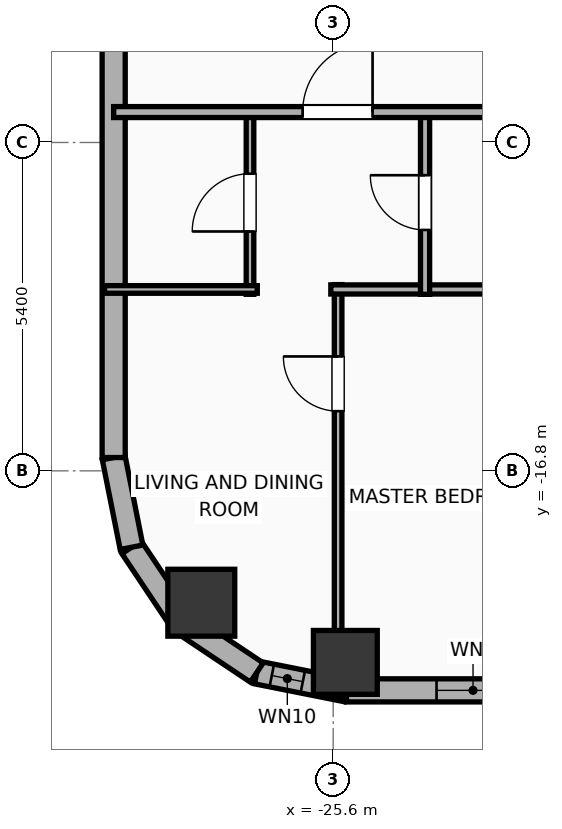
"""IFC4 building model, lengths in metres.
Left out: names, types, materials, properties, quantities, classifications, styles, units other than length and angle.
Written with IfcOpenShell. Run it as: python <this file> out.ifc"""

import sys

from ifc_helpers import new_model, si_unit, direction, frame, frame_2d, origin, origin_2d, place, context, subcontext, project, spatial, rectangle, hollow_rectangle, hollow_circle, extrude, element, fill, save


model = new_model("IFC4")
c1 = context("Model", 3, precision=1e-05, world=origin(), true_north=direction((0.0, 1.0)))
c2 = subcontext(c1, "Body", "Model", "MODEL_VIEW")
j1 = project(units=[si_unit("LENGTHUNIT", "METRE"), si_unit("PLANEANGLEUNIT", "RADIAN")], contexts=[c1])
p1 = place(None, origin())
s1 = spatial("IfcSite", under=j1, at=p1, CompositionType="ELEMENT")
p2 = place(p1, origin())
s2 = spatial("IfcBuilding", under=s1, at=p2, CompositionType="ELEMENT")
p3 = place(p2, frame((0.0, 0.0, 89.7)))
s3 = spatial("IfcBuildingStorey", under=s2, at=p3, CompositionType="ELEMENT", Elevation=89.7)
p4 = place(p3, frame((-25.4, -19.95, 0.0), z_axis=(0.0, 0.0, 1.0), x_axis=(1.0, 0.0, 0.0)))
e1 = element("IfcColumn", 1, at=p4, inside=s3, PredefinedType="COLUMN", context=c2, shape_type="SweptSolid", body=[
    extrude(hollow_rectangle(XDim=1.05, YDim=1.05, WallThickness=0.036, at=origin_2d()), origin(), (0.0, 0.0, 1.0), 3.9),
])
p5 = place(p3, frame((-27.769, -18.969, 0.0), z_axis=(0.0, 0.0, 1.0), x_axis=(1.0, 0.0, 0.0)))
e2 = element("IfcColumn", 2, at=p5, inside=s3, PredefinedType="COLUMN", context=c2, shape_type="SweptSolid", body=[
    extrude(hollow_circle(Radius=0.55, WallThickness=0.036, at=origin_2d()), origin(), (0.0, 0.0, 1.0), 3.9),
])
p6 = place(p3, frame((29.381, -20.41, 0.0), z_axis=(0.0, 0.0, 1.0), x_axis=(-1.0, 0.0, 0.0)))
e3 = element("IfcWall", 3, at=p6, inside=s3, PredefinedType="ELEMENTEDWALL", context=c2, shape_type="SweptSolid", body=[
    extrude(rectangle(XDim=54.763, YDim=0.38, at=frame_2d((27.381, 0.0))), origin(), (0.0, 0.0, 1.0), 2.54),
])
p7 = place(p6, frame((48.367, 0.0, 0.75)))
e4 = element("IfcOpeningElement", 4, at=p7, cuts=e3, PredefinedType="OPENING", context=c2, shape_type="SweptSolid", body=[
    extrude(rectangle(XDim=2.4, YDim=1.63, at=frame_2d((1.2, 0.815))), frame((0.0, 0.2, 0.0), z_axis=(0.0, -1.0, 0.0), x_axis=(1.0, 0.0, 0.0)), (0.0, 0.0, 1.0), 0.4),
])
p8 = place(p6, frame((52.081, 0.0, 0.75)))
e5 = element("IfcOpeningElement", 5, at=p8, cuts=e3, PredefinedType="OPENING", context=c2, shape_type="SweptSolid", body=[
    extrude(rectangle(XDim=1.2, YDim=1.63, at=frame_2d((0.6, 0.815))), frame((0.0, 0.2, 0.0), z_axis=(0.0, -1.0, 0.0), x_axis=(1.0, 0.0, 0.0)), (0.0, 0.0, 1.0), 0.4),
])
p9 = place(p6, frame((45.486, 0.0, 0.75)))
e6 = element("IfcOpeningElement", 6, at=p9, cuts=e3, PredefinedType="OPENING", context=c2, shape_type="SweptSolid", body=[
    extrude(rectangle(XDim=1.2, YDim=1.63, at=frame_2d((0.6, 0.815))), frame((0.0, 0.2, 0.0), z_axis=(0.0, -1.0, 0.0), x_axis=(1.0, 0.0, 0.0)), (0.0, 0.0, 1.0), 0.4),
])
p10 = place(p6, frame((40.531, 0.0, 0.75)))
e7 = element("IfcOpeningElement", 7, at=p10, cuts=e3, PredefinedType="OPENING", context=c2, shape_type="SweptSolid", body=[
    extrude(rectangle(XDim=1.2, YDim=1.63, at=frame_2d((0.6, 0.815))), frame((0.0, 0.2, 0.0), z_axis=(0.0, -1.0, 0.0), x_axis=(1.0, 0.0, 0.0)), (0.0, 0.0, 1.0), 0.4),
])
p11 = place(p6, frame((33.686, 0.0, 0.75)))
e8 = element("IfcOpeningElement", 8, at=p11, cuts=e3, PredefinedType="OPENING", context=c2, shape_type="SweptSolid", body=[
    extrude(rectangle(XDim=1.2, YDim=1.63, at=frame_2d((0.6, 0.815))), frame((0.0, 0.2, 0.0), z_axis=(0.0, -1.0, 0.0), x_axis=(1.0, 0.0, 0.0)), (0.0, 0.0, 1.0), 0.4),
])
p12 = place(p6, frame((35.976, 0.0, 0.75)))
e9 = element("IfcOpeningElement", 9, at=p12, cuts=e3, PredefinedType="OPENING", context=c2, shape_type="SweptSolid", body=[
    extrude(rectangle(XDim=1.2, YDim=1.63, at=frame_2d((0.6, 0.815))), frame((0.0, 0.2, 0.0), z_axis=(0.0, -1.0, 0.0), x_axis=(1.0, 0.0, 0.0)), (0.0, 0.0, 1.0), 0.4),
])
p13 = place(p6, frame((28.805, 0.0, 0.75)))
e10 = element("IfcOpeningElement", 10, at=p13, cuts=e3, PredefinedType="OPENING", context=c2, shape_type="SweptSolid", body=[
    extrude(rectangle(XDim=1.2, YDim=1.63, at=frame_2d((0.6, 0.815))), frame((0.0, 0.2, 0.0), z_axis=(0.0, -1.0, 0.0), x_axis=(1.0, 0.0, 0.0)), (0.0, 0.0, 1.0), 0.4),
])
p14 = place(p6, frame((25.555, 0.0, 0.75)))
e11 = element("IfcOpeningElement", 11, at=p14, cuts=e3, PredefinedType="OPENING", context=c2, shape_type="SweptSolid", body=[
    extrude(rectangle(XDim=1.2, YDim=1.63, at=frame_2d((0.6, 0.815))), frame((0.0, 0.2, 0.0), z_axis=(0.0, -1.0, 0.0), x_axis=(1.0, 0.0, 0.0)), (0.0, 0.0, 1.0), 0.4),
])
p15 = place(p6, frame((19.951, 0.0, 0.75)))
e12 = element("IfcOpeningElement", 12, at=p15, cuts=e3, PredefinedType="OPENING", context=c2, shape_type="SweptSolid", body=[
    extrude(rectangle(XDim=1.2, YDim=1.63, at=frame_2d((0.6, 0.815))), frame((0.0, 0.2, 0.0), z_axis=(0.0, -1.0, 0.0), x_axis=(1.0, 0.0, 0.0)), (0.0, 0.0, 1.0), 0.4),
])
p16 = place(p6, frame((16.008, 0.0, 0.75)))
e13 = element("IfcOpeningElement", 13, at=p16, cuts=e3, PredefinedType="OPENING", context=c2, shape_type="SweptSolid", body=[
    extrude(rectangle(XDim=1.2, YDim=1.63, at=frame_2d((0.6, 0.815))), frame((0.0, 0.2, 0.0), z_axis=(0.0, -1.0, 0.0), x_axis=(1.0, 0.0, 0.0)), (0.0, 0.0, 1.0), 0.4),
])
p17 = place(p6, frame((13.008, 0.0, 0.75)))
e14 = element("IfcOpeningElement", 14, at=p17, cuts=e3, PredefinedType="OPENING", context=c2, shape_type="SweptSolid", body=[
    extrude(rectangle(XDim=1.2, YDim=1.63, at=frame_2d((0.6, 0.815))), frame((0.0, 0.2, 0.0), z_axis=(0.0, -1.0, 0.0), x_axis=(1.0, 0.0, 0.0)), (0.0, 0.0, 1.0), 0.4),
])
p18 = place(p6, frame((8.948, 0.0, 0.75)))
e15 = element("IfcOpeningElement", 15, at=p18, cuts=e3, PredefinedType="OPENING", context=c2, shape_type="SweptSolid", body=[
    extrude(rectangle(XDim=1.2, YDim=1.63, at=frame_2d((0.6, 0.815))), frame((0.0, 0.2, 0.0), z_axis=(0.0, -1.0, 0.0), x_axis=(1.0, 0.0, 0.0)), (0.0, 0.0, 1.0), 0.4),
])
p19 = place(p6, frame((6.908, 0.0, 0.75)))
e16 = element("IfcOpeningElement", 16, at=p19, cuts=e3, PredefinedType="OPENING", context=c2, shape_type="SweptSolid", body=[
    extrude(rectangle(XDim=1.2, YDim=1.63, at=frame_2d((0.6, 0.815))), frame((0.0, 0.2, 0.0), z_axis=(0.0, -1.0, 0.0), x_axis=(1.0, 0.0, 0.0)), (0.0, 0.0, 1.0), 0.4),
])
p20 = place(p6, frame((1.695, 0.0, 0.75)))
e17 = element("IfcOpeningElement", 17, at=p20, cuts=e3, PredefinedType="OPENING", context=c2, shape_type="SweptSolid", body=[
    extrude(rectangle(XDim=1.2, YDim=1.63, at=frame_2d((0.6, 0.815))), frame((0.0, 0.2, 0.0), z_axis=(0.0, -1.0, 0.0), x_axis=(1.0, 0.0, 0.0)), (0.0, 0.0, 1.0), 0.4),
])
p21 = place(p6, frame((4.441, 0.0, 0.75)))
e18 = element("IfcOpeningElement", 18, at=p21, cuts=e3, PredefinedType="OPENING", context=c2, shape_type="SweptSolid", body=[
    extrude(rectangle(XDim=1.2, YDim=1.63, at=frame_2d((0.6, 0.815))), frame((0.0, 0.2, 0.0), z_axis=(0.0, -1.0, 0.0), x_axis=(1.0, 0.0, 0.0)), (0.0, 0.0, 1.0), 0.4),
])
p22 = place(p3, frame((-25.381, -20.41, 0.0), z_axis=(0.0, 0.0, 1.0), x_axis=(-0.980786132421, 0.195086038585, 0.0)))
e19 = element("IfcWall", 19, at=p22, inside=s3, PredefinedType="ELEMENTEDWALL", context=c2, shape_type="SweptSolid", body=[
    extrude(rectangle(XDim=1.504, YDim=0.38, at=frame_2d((0.752, 0.0))), origin(), (0.0, 0.0, 1.0), 2.54),
])
p23 = place(p22, frame((0.732, 0.0, 0.75)))
e20 = element("IfcOpeningElement", 20, at=p23, cuts=e19, PredefinedType="OPENING", context=c2, shape_type="SweptSolid", body=[
    extrude(rectangle(XDim=0.52, YDim=1.63, at=frame_2d((0.26, 0.815))), frame((0.0, 0.2, 0.0), z_axis=(0.0, -1.0, 0.0), x_axis=(1.0, 0.0, 0.0)), (0.0, 0.0, 1.0), 0.4),
])
p24 = place(p3, frame((-26.857, -20.116, 0.0), z_axis=(0.0, 0.0, 1.0), x_axis=(-0.831468045563, 0.555572577804, 0.0)))
e21 = element("IfcWall", 21, at=p24, inside=s3, PredefinedType="ELEMENTEDWALL", context=c2, shape_type="SweptSolid", body=[
    extrude(rectangle(XDim=1.485, YDim=0.38, at=frame_2d((0.742, 0.0))), origin(), (0.0, 0.0, 1.0), 2.54),
])
p25 = place(p3, frame((-28.091, -19.292, 0.0), z_axis=(0.0, 0.0, 1.0), x_axis=(-0.555610286119, 0.831442848281, 0.0)))
e22 = element("IfcWall", 22, at=p25, inside=s3, PredefinedType="ELEMENTEDWALL", context=c2, shape_type="SweptSolid", body=[
    extrude(rectangle(XDim=1.485, YDim=0.38, at=frame_2d((0.743, 0.0))), origin(), (0.0, 0.0, 1.0), 3.65),
])
p26 = place(p3, frame((-28.917, -18.057, 0.0), z_axis=(0.0, 0.0, 1.0), x_axis=(-0.195086038585, 0.980786132421, 0.0)))
e23 = element("IfcWall", 23, at=p26, inside=s3, PredefinedType="ELEMENTEDWALL", context=c2, shape_type="SweptSolid", body=[
    extrude(rectangle(XDim=1.504, YDim=0.38, at=frame_2d((0.752, 0.0))), origin(), (0.0, 0.0, 1.0), 3.65),
])
p27 = place(p3, frame((-29.21, -16.581, 0.0), z_axis=(0.0, 0.0, 1.0), x_axis=(0.0, 1.0, 0.0)))
e24 = element("IfcWall", 24, at=p27, inside=s3, PredefinedType="ELEMENTEDWALL", context=c2, shape_type="SweptSolid", body=[
    extrude(rectangle(XDim=34.363, YDim=0.38, at=frame_2d((17.181, 0.0))), origin(), (0.0, 0.0, 1.0), 2.54),
])
p28 = place(p27, frame((31.487, 0.0, 0.75)))
e25 = element("IfcOpeningElement", 25, at=p28, cuts=e24, PredefinedType="OPENING", context=c2, shape_type="SweptSolid", body=[
    extrude(rectangle(XDim=1.2, YDim=1.63, at=frame_2d((0.6, 0.815))), frame((0.0, 0.2, 0.0), z_axis=(0.0, -1.0, 0.0), x_axis=(1.0, 0.0, 0.0)), (0.0, 0.0, 1.0), 0.4),
])
p29 = place(p27, frame((20.726, 0.0, 0.75)))
e26 = element("IfcOpeningElement", 26, at=p29, cuts=e24, PredefinedType="OPENING", context=c2, shape_type="SweptSolid", body=[
    extrude(rectangle(XDim=1.2, YDim=1.63, at=frame_2d((0.6, 0.815))), frame((0.0, 0.2, 0.0), z_axis=(0.0, -1.0, 0.0), x_axis=(1.0, 0.0, 0.0)), (0.0, 0.0, 1.0), 0.4),
])
p30 = place(p27, frame((11.376, 0.0, 0.75)))
e27 = element("IfcOpeningElement", 27, at=p30, cuts=e24, PredefinedType="OPENING", context=c2, shape_type="SweptSolid", body=[
    extrude(rectangle(XDim=1.2, YDim=1.63, at=frame_2d((0.6, 0.815))), frame((0.0, 0.2, 0.0), z_axis=(0.0, -1.0, 0.0), x_axis=(1.0, 0.0, 0.0)), (0.0, 0.0, 1.0), 0.4),
])
p31 = place(p3, frame((-25.519, -20.535, 0.0), z_axis=(0.0, 0.0, 1.0), x_axis=(0.0, 1.0, 0.0)))
e28 = element("IfcWall", 28, at=p31, inside=s3, PredefinedType="PARTITIONING", context=c2, shape_type="SweptSolid", body=[
    extrude(rectangle(XDim=6.798, YDim=0.125, at=frame_2d((3.399, 0.0))), origin(), (0.0, 0.0, 1.0), 3.65),
])
p32 = place(p31, frame((4.717, 0.0, 0.0)))
e29 = element("IfcOpeningElement", 29, at=p32, cuts=e28, PredefinedType="OPENING", context=c2, shape_type="SweptSolid", body=[
    extrude(rectangle(XDim=0.9, YDim=2.05, at=frame_2d((0.45, 1.025))), frame((0.0, 0.073, 0.0), z_axis=(0.0, -1.0, 0.0), x_axis=(1.0, 0.0, 0.0)), (0.0, 0.0, 1.0), 0.145),
])
p33 = place(p3, frame((-25.639, -13.817, 0.0), z_axis=(0.0, 0.0, 1.0), x_axis=(1.0, 0.0, 0.0)))
e30 = element("IfcWall", 30, at=p33, inside=s3, PredefinedType="PLUMBINGWALL", context=c2, shape_type="SweptSolid", body=[
    extrude(rectangle(XDim=3.79, YDim=0.15, at=frame_2d((1.895, 0.0))), origin(), (0.0, 0.0, 1.0), 3.65),
])
p34 = place(p3, frame((-26.968, -13.897, 0.0), z_axis=(0.0, 0.0, 1.0), x_axis=(0.0, 1.0, 0.0)))
e31 = element("IfcWall", 31, at=p34, inside=s3, PredefinedType="PARTITIONING", context=c2, shape_type="SweptSolid", body=[
    extrude(rectangle(XDim=3.017, YDim=0.125, at=frame_2d((1.509, 0.0))), origin(), (0.0, 0.0, 1.0), 3.65),
])
p35 = place(p34, frame((1.033, 0.0, 0.0)))
e32 = element("IfcOpeningElement", 32, at=p35, cuts=e31, PredefinedType="OPENING", context=c2, shape_type="SweptSolid", body=[
    extrude(rectangle(XDim=0.95, YDim=2.05, at=frame_2d((0.475, 1.025))), frame((0.0, 0.073, 0.0), z_axis=(0.0, -1.0, 0.0), x_axis=(1.0, 0.0, 0.0)), (0.0, 0.0, 1.0), 0.145),
])
p36 = place(p3, frame((-29.36, -13.817, 0.0), z_axis=(0.0, 0.0, 1.0), x_axis=(1.0, 0.0, 0.0)))
e33 = element("IfcWall", 33, at=p36, inside=s3, PredefinedType="PARTITIONING", context=c2, shape_type="SweptSolid", body=[
    extrude(rectangle(XDim=2.512, YDim=0.125, at=frame_2d((1.256, 0.0))), origin(), (0.0, 0.0, 1.0), 3.65),
])
p37 = place(p3, frame((-24.089, -13.897, 0.0), z_axis=(0.0, 0.0, 1.0), x_axis=(0.0, 1.0, 0.0)))
e34 = element("IfcWall", 34, at=p37, inside=s3, PredefinedType="PLUMBINGWALL", context=c2, shape_type="SweptSolid", body=[
    extrude(rectangle(XDim=3.017, YDim=0.15, at=frame_2d((1.509, 0.0))), origin(), (0.0, 0.0, 1.0), 3.65),
])
p38 = place(p37, frame((1.059, 0.0, 0.0)))
e35 = element("IfcOpeningElement", 35, at=p38, cuts=e34, PredefinedType="OPENING", context=c2, shape_type="SweptSolid", body=[
    extrude(rectangle(XDim=0.9, YDim=2.05, at=frame_2d((0.45, 1.025))), frame((0.0, 0.085, 0.0), z_axis=(0.0, -1.0, 0.0), x_axis=(1.0, 0.0, 0.0)), (0.0, 0.0, 1.0), 0.17),
])
p39 = place(p3, frame((-29.21, -10.9, 0.0), z_axis=(0.0, 0.0, 1.0), x_axis=(1.0, 0.0, 0.0)))
e36 = element("IfcWall", 36, at=p39, inside=s3, PredefinedType="PARTITIONING", context=c2, shape_type="SweptSolid", body=[
    extrude(rectangle(XDim=62.42, YDim=0.18, at=frame_2d((31.21, 0.0))), origin(), (0.0, 0.0, 1.0), 3.65),
])
p40 = place(p39, frame((3.108, 0.0, 0.0)))
e37 = element("IfcOpeningElement", 37, at=p40, cuts=e36, PredefinedType="OPENING", context=c2, shape_type="SweptSolid", body=[
    extrude(rectangle(XDim=1.15, YDim=2.05, at=frame_2d((0.575, 1.025))), frame((0.0, 0.1, 0.0), z_axis=(0.0, -1.0, 0.0), x_axis=(1.0, 0.0, 0.0)), (0.0, 0.0, 1.0), 0.2),
])
p41 = place(p39, frame((10.242, 0.0, 0.0)))
e38 = element("IfcOpeningElement", 38, at=p41, cuts=e36, PredefinedType="OPENING", context=c2, shape_type="SweptSolid", body=[
    extrude(rectangle(XDim=1.15, YDim=2.05, at=frame_2d((0.575, 1.025))), frame((0.0, 0.1, 0.0), z_axis=(0.0, -1.0, 0.0), x_axis=(1.0, 0.0, 0.0)), (0.0, 0.0, 1.0), 0.2),
])
p42 = place(p39, frame((17.14, 0.0, 0.0)))
e39 = element("IfcOpeningElement", 39, at=p42, cuts=e36, PredefinedType="OPENING", context=c2, shape_type="SweptSolid", body=[
    extrude(rectangle(XDim=0.9, YDim=2.05, at=frame_2d((0.45, 1.025))), frame((0.0, 0.1, 0.0), z_axis=(0.0, -1.0, 0.0), x_axis=(1.0, 0.0, 0.0)), (0.0, 0.0, 1.0), 0.2),
])
p43 = place(p39, frame((24.661, 0.0, 0.0)))
e40 = element("IfcOpeningElement", 40, at=p43, cuts=e36, PredefinedType="OPENING", context=c2, shape_type="SweptSolid", body=[
    extrude(rectangle(XDim=1.15, YDim=2.05, at=frame_2d((0.575, 1.025))), frame((0.0, 0.1, 0.0), z_axis=(0.0, -1.0, 0.0), x_axis=(1.0, 0.0, 0.0)), (0.0, 0.0, 1.0), 0.2),
])
p44 = place(p39, frame((28.644, 0.0, 0.0)))
e41 = element("IfcOpeningElement", 41, at=p44, cuts=e36, PredefinedType="OPENING", context=c2, shape_type="SweptSolid", body=[
    extrude(rectangle(XDim=1.15, YDim=2.05, at=frame_2d((0.575, 1.025))), frame((0.0, 0.1, 0.0), z_axis=(0.0, -1.0, 0.0), x_axis=(1.0, 0.0, 0.0)), (0.0, 0.0, 1.0), 0.2),
])
p45 = place(p39, frame((36.64, 0.0, 0.0)))
e42 = element("IfcOpeningElement", 42, at=p45, cuts=e36, PredefinedType="OPENING", context=c2, shape_type="SweptSolid", body=[
    extrude(rectangle(XDim=0.9, YDim=2.05, at=frame_2d((0.45, 1.025))), frame((0.0, 0.1, 0.0), z_axis=(0.0, -1.0, 0.0), x_axis=(1.0, 0.0, 0.0)), (0.0, 0.0, 1.0), 0.2),
])
p46 = place(p39, frame((41.44, 0.0, 0.0)))
e43 = element("IfcOpeningElement", 43, at=p46, cuts=e36, PredefinedType="OPENING", context=c2, shape_type="SweptSolid", body=[
    extrude(rectangle(XDim=1.15, YDim=2.05, at=frame_2d((0.575, 1.025))), frame((0.0, 0.1, 0.0), z_axis=(0.0, -1.0, 0.0), x_axis=(1.0, 0.0, 0.0)), (0.0, 0.0, 1.0), 0.2),
])
p47 = place(p39, frame((47.538, 0.0, 0.0)))
e44 = element("IfcOpeningElement", 44, at=p47, cuts=e36, PredefinedType="OPENING", context=c2, shape_type="SweptSolid", body=[
    extrude(rectangle(XDim=1.15, YDim=2.05, at=frame_2d((0.575, 1.025))), frame((0.0, 0.1, 0.0), z_axis=(0.0, -1.0, 0.0), x_axis=(1.0, 0.0, 0.0)), (0.0, 0.0, 1.0), 0.2),
])
p48 = place(p39, frame((57.157, 0.0, 0.0)))
e45 = element("IfcOpeningElement", 45, at=p48, cuts=e36, PredefinedType="OPENING", context=c2, shape_type="SweptSolid", body=[
    extrude(rectangle(XDim=1.15, YDim=2.05, at=frame_2d((0.575, 1.025))), frame((0.0, 0.1, 0.0), z_axis=(0.0, -1.0, 0.0), x_axis=(1.0, 0.0, 0.0)), (0.0, 0.0, 1.0), 0.2),
])
p49 = place(p23, origin())
e46 = element("IfcWindow", 46, at=p49, inside=s3, PartitioningType="SINGLE_PANEL", PredefinedType="WINDOW", context=c2, shape_type="SweptSolid", body=[
    extrude(rectangle(XDim=0.52, YDim=1.63, at=frame_2d((0.26, 0.815))), frame((0.0, 0.03, 0.0), z_axis=(0.0, -1.0, 0.0), x_axis=(1.0, 0.0, 0.0)), (0.0, 0.0, 1.0), 0.06),
])
fill(e20, e46)
p50 = place(p8, origin())
e47 = element("IfcWindow", 47, at=p50, inside=s3, PartitioningType="SINGLE_PANEL", PredefinedType="WINDOW", context=c2, shape_type="SweptSolid", body=[
    extrude(rectangle(XDim=1.2, YDim=1.63, at=frame_2d((0.6, 0.815))), frame((0.0, 0.03, 0.0), z_axis=(0.0, -1.0, 0.0), x_axis=(1.0, 0.0, 0.0)), (0.0, 0.0, 1.0), 0.06),
])
fill(e5, e47)
p51 = place(p32, origin())
e48 = element("IfcDoor", 48, at=p51, inside=s3, OperationType="SINGLE_SWING_RIGHT", PredefinedType="DOOR", context=c2, shape_type="SweptSolid", body=[
    extrude(rectangle(XDim=0.9, YDim=2.05, at=frame_2d((0.45, 1.025))), frame((0.0, 0.025, 0.0), z_axis=(0.0, -1.0, 0.0), x_axis=(1.0, 0.0, 0.0)), (0.0, 0.0, 1.0), 0.05),
])
fill(e29, e48)
p52 = place(p35, origin())
e49 = element("IfcDoor", 49, at=p52, inside=s3, OperationType="SINGLE_SWING_LEFT", PredefinedType="DOOR", context=c2, shape_type="SweptSolid", body=[
    extrude(rectangle(XDim=0.95, YDim=2.05, at=frame_2d((0.475, 1.025))), frame((0.0, 0.025, 0.0), z_axis=(0.0, -1.0, 0.0), x_axis=(1.0, 0.0, 0.0)), (0.0, 0.0, 1.0), 0.05),
])
fill(e32, e49)
p53 = place(p38, origin())
e50 = element("IfcDoor", 50, at=p53, inside=s3, OperationType="SINGLE_SWING_RIGHT", PredefinedType="DOOR", context=c2, shape_type="SweptSolid", body=[
    extrude(rectangle(XDim=0.9, YDim=2.05, at=frame_2d((0.45, 1.025))), frame((0.0, 0.025, 0.0), z_axis=(0.0, -1.0, 0.0), x_axis=(1.0, 0.0, 0.0)), (0.0, 0.0, 1.0), 0.05),
])
fill(e35, e50)
p54 = place(p40, origin())
e51 = element("IfcDoor", 51, at=p54, inside=s3, OperationType="SINGLE_SWING_RIGHT", PredefinedType="DOOR", context=c2, shape_type="SweptSolid", body=[
    extrude(rectangle(XDim=1.15, YDim=2.05, at=frame_2d((0.575, 1.025))), frame((0.0, 0.025, 0.0), z_axis=(0.0, -1.0, 0.0), x_axis=(1.0, 0.0, 0.0)), (0.0, 0.0, 1.0), 0.05),
])
fill(e37, e51)
save(model, sys.argv[1])
